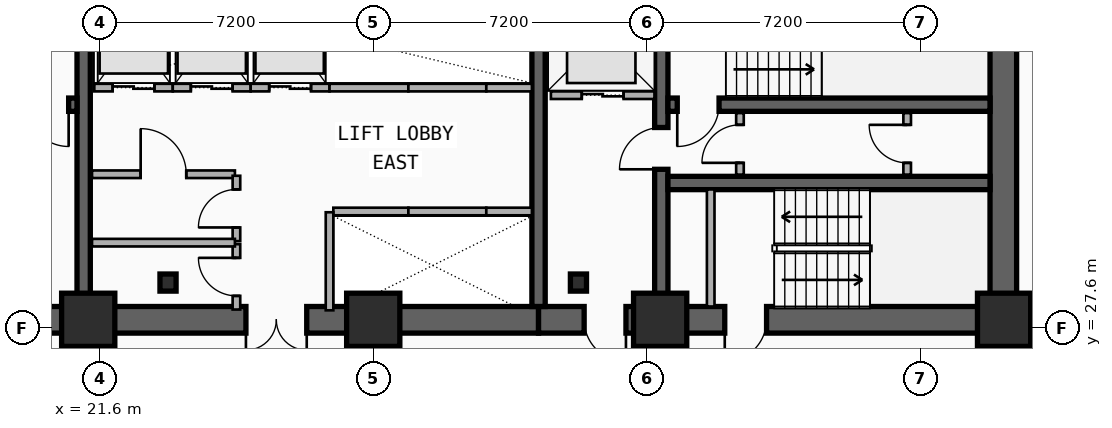
"""IFC4 building model, lengths in metres.
Left out: names, types, materials, properties, quantities, classifications, styles, units other than length and angle.
Written with IfcOpenShell. Run it as: python <this file> out.ifc"""

import sys

from ifc_helpers import new_model, si_unit, direction, frame, frame_2d, origin, origin_2d, place, context, subcontext, project, spatial, rectangle, i_section, extrude, element, fill, save


model = new_model("IFC4")
c1 = context("Model", 3, precision=1e-05, world=origin(), true_north=direction((0.0, 1.0)))
c2 = subcontext(c1, "Body", "Model", "MODEL_VIEW")
j1 = project(units=[si_unit("LENGTHUNIT", "METRE"), si_unit("PLANEANGLEUNIT", "RADIAN")], contexts=[c1])
p1 = place(None, origin())
s1 = spatial("IfcSite", under=j1, at=p1, CompositionType="ELEMENT")
p2 = place(p1, origin())
s2 = spatial("IfcBuilding", under=s1, at=p2, CompositionType="ELEMENT")
p3 = place(p2, frame((0.0, 0.0, 57.0)))
s3 = spatial("IfcBuildingStorey", under=s2, at=p3, CompositionType="ELEMENT", Elevation=57.0)
p4 = place(p3, frame((21.18, 27.82, 0.0), z_axis=(0.0, 0.0, 1.0), x_axis=(-1.0, 0.0, 0.0)))
e1 = element("IfcWall", 1, at=p4, inside=s3, PredefinedType="SHEAR", context=c2, shape_type="SweptSolid", body=[
    extrude(rectangle(XDim=9.03, YDim=0.7, at=frame_2d((4.515, 0.0))), origin(), (0.0, 0.0, 1.0), 3.5),
])
p5 = place(p4, frame((2.68, 0.0, 0.0)))
e2 = element("IfcOpeningElement", 2, at=p5, cuts=e1, PredefinedType="OPENING", context=c2, shape_type="SweptSolid", body=[
    extrude(rectangle(XDim=1.1, YDim=2.15, at=frame_2d((0.55, 1.075))), frame((0.0, 0.36, 0.0), z_axis=(0.0, -1.0, 0.0), x_axis=(1.0, 0.0, 0.0)), (0.0, 0.0, 1.0), 0.72),
])
p6 = place(p3, frame((33.15, 27.82, 0.0), z_axis=(0.0, 0.0, 1.0), x_axis=(-1.0, 0.0, 0.0)))
e3 = element("IfcWall", 3, at=p6, inside=s3, PredefinedType="SHEAR", context=c2, shape_type="SweptSolid", body=[
    extrude(rectangle(XDim=11.97, YDim=0.7, at=frame_2d((5.985, 0.0))), origin(), (0.0, 0.0, 1.0), 3.5),
])
p7 = place(p6, frame((6.1, 0.0, 0.0)))
e4 = element("IfcOpeningElement", 4, at=p7, cuts=e3, PredefinedType="OPENING", context=c2, shape_type="SweptSolid", body=[
    extrude(rectangle(XDim=1.6, YDim=2.2, at=frame_2d((0.8, 1.1))), frame((0.0, 0.36, 0.0), z_axis=(0.0, -1.0, 0.0), x_axis=(1.0, 0.0, 0.0)), (0.0, 0.0, 1.0), 0.72),
])
p8 = place(p3, frame((45.38, 27.82, 0.0), z_axis=(0.0, 0.0, 1.0), x_axis=(-1.0, 0.0, 0.0)))
e5 = element("IfcWall", 5, at=p8, inside=s3, PredefinedType="SHEAR", context=c2, shape_type="SweptSolid", body=[
    extrude(rectangle(XDim=12.23, YDim=0.7, at=frame_2d((6.115, 0.0))), origin(), (0.0, 0.0, 1.0), 3.5),
])
p9 = place(p8, frame((9.93, 0.0, 0.0)))
e6 = element("IfcOpeningElement", 6, at=p9, cuts=e5, PredefinedType="OPENING", context=c2, shape_type="SweptSolid", body=[
    extrude(rectangle(XDim=1.1, YDim=2.15, at=frame_2d((0.55, 1.075))), frame((0.0, 0.36, 0.0), z_axis=(0.0, -1.0, 0.0), x_axis=(1.0, 0.0, 0.0)), (0.0, 0.0, 1.0), 0.72),
])
p10 = place(p8, frame((6.23, 0.0, 0.0)))
e7 = element("IfcOpeningElement", 7, at=p10, cuts=e5, PredefinedType="OPENING", context=c2, shape_type="SweptSolid", body=[
    extrude(rectangle(XDim=1.1, YDim=2.15, at=frame_2d((0.55, 1.075))), frame((0.0, 0.36, 0.0), z_axis=(0.0, -1.0, 0.0), x_axis=(1.0, 0.0, 0.0)), (0.0, 0.0, 1.0), 0.72),
])
p11 = place(p3, frame((45.38, 28.17, 0.0), z_axis=(0.0, 0.0, 1.0), x_axis=(0.0, 1.0, 0.0)))
e8 = element("IfcWall", 8, at=p11, inside=s3, PredefinedType="SHEAR", context=c2, shape_type="SweptSolid", body=[
    extrude(rectangle(XDim=8.53, YDim=0.7, at=frame_2d((4.265, 0.0))), origin(), (0.0, 0.0, 1.0), 3.5),
])
for number, where, z_axis, x_axis in (
    (9, (21.18, 28.17, 0.0), (0.0, 0.0, 1.0), (0.0, 1.0, 0.0)),
    (10, (33.15, 28.17, 0.0), (0.0, 0.0, 1.0), (0.0, 1.0, 0.0)),
):
    element("IfcWall", number, at=place(p3, frame(where, z_axis=z_axis, x_axis=x_axis)), inside=s3, PredefinedType="SHEAR", context=c2, shape_type="SweptSolid", body=[
        extrude(rectangle(XDim=8.53, YDim=0.35, at=frame_2d((4.265, 0.0))), origin(), (0.0, 0.0, 1.0), 3.5),
    ])
p12 = place(p3, frame((36.38, 28.17, 0.0), z_axis=(0.0, 0.0, 1.0), x_axis=(0.0, 1.0, 0.0)))
e11 = element("IfcWall", 11, at=p12, inside=s3, PredefinedType="SHEAR", context=c2, shape_type="SweptSolid", body=[
    extrude(rectangle(XDim=8.53, YDim=0.35, at=frame_2d((4.265, 0.0))), origin(), (0.0, 0.0, 1.0), 3.5),
])
p13 = place(p12, frame((3.61, 0.0, 0.0)))
e12 = element("IfcOpeningElement", 12, at=p13, cuts=e11, PredefinedType="OPENING", context=c2, shape_type="SweptSolid", body=[
    extrude(rectangle(XDim=1.1, YDim=2.15, at=frame_2d((0.55, 1.075))), frame((0.0, 0.185, 0.0), z_axis=(0.0, -1.0, 0.0), x_axis=(1.0, 0.0, 0.0)), (0.0, 0.0, 1.0), 0.37),
])
p14 = place(p3, frame((21.005, 33.48, 0.0), z_axis=(0.0, 0.0, 1.0), x_axis=(-1.0, 0.0, 0.0)))
e13 = element("IfcWall", 13, at=p14, inside=s3, PredefinedType="SHEAR", context=c2, shape_type="SweptSolid", body=[
    extrude(rectangle(XDim=8.505, YDim=0.35, at=frame_2d((4.252, 0.0))), origin(), (0.0, 0.0, 1.0), 3.5),
])
p15 = place(p14, frame((0.22, 0.0, 0.0)))
e14 = element("IfcOpeningElement", 14, at=p15, cuts=e13, PredefinedType="OPENING", context=c2, shape_type="SweptSolid", body=[
    extrude(rectangle(XDim=1.1, YDim=2.15, at=frame_2d((0.55, 1.075))), frame((0.0, 0.185, 0.0), z_axis=(0.0, -1.0, 0.0), x_axis=(1.0, 0.0, 0.0)), (0.0, 0.0, 1.0), 0.37),
])
p16 = place(p3, frame((45.03, 33.48, 0.0), z_axis=(0.0, 0.0, 1.0), x_axis=(-1.0, 0.0, 0.0)))
e15 = element("IfcWall", 15, at=p16, inside=s3, PredefinedType="SHEAR", context=c2, shape_type="SweptSolid", body=[
    extrude(rectangle(XDim=8.475, YDim=0.35, at=frame_2d((4.238, 0.0))), origin(), (0.0, 0.0, 1.0), 3.5),
])
p17 = place(p16, frame((7.13, 0.0, 0.0)))
e16 = element("IfcOpeningElement", 16, at=p17, cuts=e15, PredefinedType="OPENING", context=c2, shape_type="SweptSolid", body=[
    extrude(rectangle(XDim=1.1, YDim=2.15, at=frame_2d((0.55, 1.075))), frame((0.0, 0.185, 0.0), z_axis=(0.0, -1.0, 0.0), x_axis=(1.0, 0.0, 0.0)), (0.0, 0.0, 1.0), 0.37),
])
p18 = place(p3, frame((36.555, 31.42, 0.0), z_axis=(0.0, 0.0, 1.0), x_axis=(1.0, 0.0, 0.0)))
e17 = element("IfcWall", 17, at=p18, inside=s3, PredefinedType="SHEAR", context=c2, shape_type="SweptSolid", body=[
    extrude(rectangle(XDim=8.475, YDim=0.35, at=frame_2d((4.238, 0.0))), origin(), (0.0, 0.0, 1.0), 3.5),
])
for number, where, z_axis, x_axis in (
    (18, (23.4, 28.8, 0.0), (0.0, 0.0, 1.0), (1.0, 0.0, 0.0)),
    (19, (34.2, 28.8, 0.0), (0.0, 0.0, 1.0), (1.0, 0.0, 0.0)),
):
    element("IfcColumn", number, at=place(p3, frame(where, z_axis=z_axis, x_axis=x_axis)), inside=s3, PredefinedType="COLUMN", context=c2, shape_type="SweptSolid", body=[
        extrude(i_section(OverallWidth=0.424, OverallDepth=0.45, WebThickness=0.041, FlangeThickness=0.065, FilletRadius=0.015, at=origin_2d()), origin(), (0.0, 0.0, 1.0), 3.5),
    ])
for number, where, z_axis, x_axis in (
    (20, (21.3, 27.82, 0.0), (0.0, 0.0, 1.0), (1.0, 0.0, 0.0)),
    (21, (28.8, 27.82, 0.0), (0.0, 0.0, 1.0), (1.0, 0.0, 0.0)),
    (22, (36.35, 27.82, 0.0), (0.0, 0.0, 1.0), (1.0, 0.0, 0.0)),
    (23, (45.4, 27.82, 0.0), (0.0, 0.0, 1.0), (1.0, 0.0, 0.0)),
):
    element("IfcColumn", number, at=place(p3, frame(where, z_axis=z_axis, x_axis=x_axis)), inside=s3, PredefinedType="COLUMN", context=c2, shape_type="SweptSolid", body=[
        extrude(rectangle(XDim=1.4, YDim=1.4, at=origin_2d()), origin(), (0.0, 0.0, 1.0), 3.5),
    ])
p19 = place(p3, frame((33.475, 33.73, 0.0), z_axis=(0.0, 0.0, 1.0), x_axis=(1.0, 0.0, 0.0)))
e24 = element("IfcWall", 24, at=p19, inside=s3, PredefinedType="PARTITIONING", context=c2, shape_type="SweptSolid", body=[
    extrude(rectangle(XDim=2.725, YDim=0.2, at=frame_2d((1.362, 0.0))), origin(), (0.0, 0.0, 1.0), 2.212),
])
p20 = place(p19, frame((0.812, 0.0, 0.0)))
e25 = element("IfcOpeningElement", 25, at=p20, cuts=e24, PredefinedType="OPENING", context=c2, shape_type="SweptSolid", body=[
    extrude(rectangle(XDim=1.1, YDim=2.15, at=frame_2d((0.55, 1.075))), frame((0.0, 0.11, 0.0), z_axis=(0.0, -1.0, 0.0), x_axis=(1.0, 0.0, 0.0)), (0.0, 0.0, 1.0), 0.22),
])
p21 = place(p3, frame((27.75, 30.67, 0.0), z_axis=(0.0, 0.0, 1.0), x_axis=(1.0, 0.0, 0.0)))
e26 = element("IfcWall", 26, at=p21, inside=s3, PredefinedType="PARTITIONING", context=c2, shape_type="SweptSolid", body=[
    extrude(rectangle(XDim=1.975, YDim=0.2, at=frame_2d((0.988, 0.0))), origin(), (0.0, 0.0, 1.0), 2.212),
])
p22 = place(p3, frame((27.65, 28.07, 0.0), z_axis=(0.0, 0.0, 1.0), x_axis=(0.0, 1.0, 0.0)))
e27 = element("IfcWall", 27, at=p22, inside=s3, PredefinedType="PARTITIONING", context=c2, shape_type="SweptSolid", body=[
    extrude(rectangle(XDim=2.58, YDim=0.2, at=frame_2d((1.29, 0.0))), origin(), (0.0, 0.0, 1.0), 2.212),
])
p23 = place(p3, frame((29.725, 30.67, 0.0), z_axis=(0.0, 0.0, 1.0), x_axis=(1.0, 0.0, 0.0)))
e28 = element("IfcWall", 28, at=p23, inside=s3, PredefinedType="PARTITIONING", context=c2, shape_type="SweptSolid", body=[
    extrude(rectangle(XDim=2.05, YDim=0.2, at=frame_2d((1.025, 0.0))), origin(), (0.0, 0.0, 1.0), 2.62),
])
p24 = place(p3, frame((31.775, 30.67, 0.0), z_axis=(0.0, 0.0, 1.0), x_axis=(1.0, 0.0, 0.0)))
e29 = element("IfcWall", 29, at=p24, inside=s3, PredefinedType="PARTITIONING", context=c2, shape_type="SweptSolid", body=[
    extrude(rectangle(XDim=1.2, YDim=0.2, at=frame_2d((0.6, 0.0))), origin(), (0.0, 0.0, 1.0), 2.62),
])
p25 = place(p3, frame((21.46, 33.93, 0.0), z_axis=(0.0, 0.0, 1.0), x_axis=(1.0, 0.0, 0.0)))
e30 = element("IfcWall", 30, at=p25, inside=s3, PredefinedType="PARTITIONING", context=c2, shape_type="SweptSolid", body=[
    extrude(rectangle(XDim=2.065, YDim=0.2, at=frame_2d((1.032, 0.0))), origin(), (0.0, 0.0, 1.0), 2.212),
])
p26 = place(p25, frame((0.482, 0.0, 0.0)))
e31 = element("IfcOpeningElement", 31, at=p26, cuts=e30, PredefinedType="OPENING", context=c2, shape_type="SweptSolid", body=[
    extrude(rectangle(XDim=1.1, YDim=2.15, at=frame_2d((0.55, 1.075))), frame((0.0, 0.11, 0.0), z_axis=(0.0, -1.0, 0.0), x_axis=(1.0, 0.0, 0.0)), (0.0, 0.0, 1.0), 0.22),
])
p27 = place(p3, frame((23.525, 33.93, 0.0), z_axis=(0.0, 0.0, 1.0), x_axis=(1.0, 0.0, 0.0)))
e32 = element("IfcWall", 32, at=p27, inside=s3, PredefinedType="PARTITIONING", context=c2, shape_type="SweptSolid", body=[
    extrude(rectangle(XDim=2.05, YDim=0.2, at=frame_2d((1.025, 0.0))), origin(), (0.0, 0.0, 1.0), 3.24),
])
p28 = place(p27, frame((0.475, 0.0, 0.0)))
e33 = element("IfcOpeningElement", 33, at=p28, cuts=e32, PredefinedType="OPENING", context=c2, shape_type="SweptSolid", body=[
    extrude(rectangle(XDim=1.1, YDim=2.15, at=frame_2d((0.55, 1.075))), frame((0.0, 0.11, 0.0), z_axis=(0.0, -1.0, 0.0), x_axis=(1.0, 0.0, 0.0)), (0.0, 0.0, 1.0), 0.22),
])
p29 = place(p3, frame((25.575, 33.93, 0.0), z_axis=(0.0, 0.0, 1.0), x_axis=(1.0, 0.0, 0.0)))
e34 = element("IfcWall", 34, at=p29, inside=s3, PredefinedType="PARTITIONING", context=c2, shape_type="SweptSolid", body=[
    extrude(rectangle(XDim=2.075, YDim=0.2, at=frame_2d((1.038, 0.0))), origin(), (0.0, 0.0, 1.0), 3.24),
])
p30 = place(p29, frame((0.488, 0.0, 0.0)))
e35 = element("IfcOpeningElement", 35, at=p30, cuts=e34, PredefinedType="OPENING", context=c2, shape_type="SweptSolid", body=[
    extrude(rectangle(XDim=1.1, YDim=2.15, at=frame_2d((0.55, 1.075))), frame((0.0, 0.11, 0.0), z_axis=(0.0, -1.0, 0.0), x_axis=(1.0, 0.0, 0.0)), (0.0, 0.0, 1.0), 0.22),
])
p31 = place(p3, frame((27.65, 33.93, 0.0), z_axis=(0.0, 0.0, 1.0), x_axis=(1.0, 0.0, 0.0)))
e36 = element("IfcWall", 36, at=p31, inside=s3, PredefinedType="PARTITIONING", context=c2, shape_type="SweptSolid", body=[
    extrude(rectangle(XDim=2.075, YDim=0.2, at=frame_2d((1.038, 0.0))), origin(), (0.0, 0.0, 1.0), 2.212),
])
p32 = place(p3, frame((29.725, 33.93, 0.0), z_axis=(0.0, 0.0, 1.0), x_axis=(1.0, 0.0, 0.0)))
e37 = element("IfcWall", 37, at=p32, inside=s3, PredefinedType="PARTITIONING", context=c2, shape_type="SweptSolid", body=[
    extrude(rectangle(XDim=2.05, YDim=0.2, at=frame_2d((1.025, 0.0))), origin(), (0.0, 0.0, 1.0), 3.24),
])
p33 = place(p3, frame((31.775, 33.93, 0.0), z_axis=(0.0, 0.0, 1.0), x_axis=(1.0, 0.0, 0.0)))
e38 = element("IfcWall", 38, at=p33, inside=s3, PredefinedType="PARTITIONING", context=c2, shape_type="SweptSolid", body=[
    extrude(rectangle(XDim=1.2, YDim=0.2, at=frame_2d((0.6, 0.0))), origin(), (0.0, 0.0, 1.0), 3.24),
])
p34 = place(p3, frame((37.68, 28.17, 0.0), z_axis=(0.0, 0.0, 1.0), x_axis=(0.0, 1.0, 0.0)))
e39 = element("IfcWall", 39, at=p34, inside=s3, PredefinedType="PARTITIONING", context=c2, shape_type="SweptSolid", body=[
    extrude(rectangle(XDim=3.08, YDim=0.2, at=frame_2d((1.54, 0.0))), origin(), (0.0, 0.0, 1.0), 2.62),
])
p35 = place(p3, frame((38.45, 31.64, 0.0), z_axis=(0.0, 0.0, 1.0), x_axis=(0.0, 1.0, 0.0)))
e40 = element("IfcWall", 40, at=p35, inside=s3, PredefinedType="PARTITIONING", context=c2, shape_type="SweptSolid", body=[
    extrude(rectangle(XDim=1.62, YDim=0.2, at=frame_2d((0.81, 0.0))), origin(), (0.0, 0.0, 1.0), 3.24),
])
p36 = place(p35, frame((0.31, 0.0, 0.0)))
e41 = element("IfcOpeningElement", 41, at=p36, cuts=e40, PredefinedType="OPENING", context=c2, shape_type="SweptSolid", body=[
    extrude(rectangle(XDim=1.0, YDim=2.15, at=frame_2d((0.5, 1.075))), frame((0.0, 0.11, 0.0), z_axis=(0.0, -1.0, 0.0), x_axis=(1.0, 0.0, 0.0)), (0.0, 0.0, 1.0), 0.22),
])
p37 = place(p3, frame((42.85, 31.64, 0.0), z_axis=(0.0, 0.0, 1.0), x_axis=(0.0, 1.0, 0.0)))
e42 = element("IfcWall", 42, at=p37, inside=s3, PredefinedType="PARTITIONING", context=c2, shape_type="SweptSolid", body=[
    extrude(rectangle(XDim=1.62, YDim=0.2, at=frame_2d((0.81, 0.0))), origin(), (0.0, 0.0, 1.0), 3.24),
])
p38 = place(p37, frame((0.31, 0.0, 0.0)))
e43 = element("IfcOpeningElement", 43, at=p38, cuts=e42, PredefinedType="OPENING", context=c2, shape_type="SweptSolid", body=[
    extrude(rectangle(XDim=1.0, YDim=2.15, at=frame_2d((0.5, 1.075))), frame((0.0, 0.11, 0.0), z_axis=(0.0, -1.0, 0.0), x_axis=(1.0, 0.0, 0.0)), (0.0, 0.0, 1.0), 0.22),
])
p39 = place(p3, frame((21.4, 31.65, 0.0), z_axis=(0.0, 0.0, 1.0), x_axis=(1.0, 0.0, 0.0)))
e44 = element("IfcWall", 44, at=p39, inside=s3, PredefinedType="PARTITIONING", context=c2, shape_type="SweptSolid", body=[
    extrude(rectangle(XDim=3.76, YDim=0.2, at=frame_2d((1.88, 0.0))), origin(), (0.0, 0.0, 1.0), 2.28),
])
p40 = place(p39, frame((1.28, 0.0, 0.0)))
e45 = element("IfcOpeningElement", 45, at=p40, cuts=e44, PredefinedType="OPENING", context=c2, shape_type="SweptSolid", body=[
    extrude(rectangle(XDim=1.2, YDim=2.15, at=frame_2d((0.6, 1.075))), frame((0.0, 0.11, 0.0), z_axis=(0.0, -1.0, 0.0), x_axis=(1.0, 0.0, 0.0)), (0.0, 0.0, 1.0), 0.22),
])
p41 = place(p3, frame((25.2, 28.09, 0.0), z_axis=(0.0, 0.0, 1.0), x_axis=(0.0, 1.0, 0.0)))
e46 = element("IfcWall", 46, at=p41, inside=s3, PredefinedType="PARTITIONING", context=c2, shape_type="SweptSolid", body=[
    extrude(rectangle(XDim=1.72, YDim=0.2, at=frame_2d((0.86, 0.0))), origin(), (0.0, 0.0, 1.0), 2.62),
])
p42 = place(p41, frame((0.36, 0.0, 0.0)))
e47 = element("IfcOpeningElement", 47, at=p42, cuts=e46, PredefinedType="OPENING", context=c2, shape_type="SweptSolid", body=[
    extrude(rectangle(XDim=1.0, YDim=2.15, at=frame_2d((0.5, 1.075))), frame((0.0, 0.11, 0.0), z_axis=(0.0, -1.0, 0.0), x_axis=(1.0, 0.0, 0.0)), (0.0, 0.0, 1.0), 0.22),
])
p43 = place(p3, frame((25.2, 29.89, 0.0), z_axis=(0.0, 0.0, 1.0), x_axis=(0.0, 1.0, 0.0)))
e48 = element("IfcWall", 48, at=p43, inside=s3, PredefinedType="PARTITIONING", context=c2, shape_type="SweptSolid", body=[
    extrude(rectangle(XDim=1.72, YDim=0.2, at=frame_2d((0.86, 0.0))), origin(), (0.0, 0.0, 1.0), 3.24),
])
p44 = place(p43, frame((0.36, 0.0, 0.0)))
e49 = element("IfcOpeningElement", 49, at=p44, cuts=e48, PredefinedType="OPENING", context=c2, shape_type="SweptSolid", body=[
    extrude(rectangle(XDim=1.0, YDim=2.15, at=frame_2d((0.5, 1.075))), frame((0.0, 0.11, 0.0), z_axis=(0.0, -1.0, 0.0), x_axis=(1.0, 0.0, 0.0)), (0.0, 0.0, 1.0), 0.22),
])
p45 = place(p3, frame((21.4, 29.85, 0.0), z_axis=(0.0, 0.0, 1.0), x_axis=(1.0, 0.0, 0.0)))
e50 = element("IfcWall", 50, at=p45, inside=s3, PredefinedType="PARTITIONING", context=c2, shape_type="SweptSolid", body=[
    extrude(rectangle(XDim=3.76, YDim=0.2, at=frame_2d((1.88, 0.0))), origin(), (0.0, 0.0, 1.0), 2.28),
])
p46 = place(p3, frame((45.41, 27.6, 0.0), z_axis=(0.0, 0.0, 1.0), x_axis=(1.0, 0.0, 0.0)))
e51 = element("IfcWall", 51, at=p46, inside=s3, PredefinedType="PARTITIONING", context=c2, shape_type="SweptSolid", body=[
    extrude(rectangle(XDim=0.91, YDim=0.16, at=frame_2d((0.455, 0.0))), origin(), (0.0, 0.0, 1.0), 2.28),
])
p47 = place(p20, origin())
e52 = element("IfcDoor", 52, at=p47, inside=s3, OperationType="DOUBLE_DOOR_SLIDING", PredefinedType="DOOR", context=c2, shape_type="SweptSolid", body=[
    extrude(rectangle(XDim=1.1, YDim=2.15, at=frame_2d((0.55, 1.075))), frame((0.0, 0.025, 0.0), z_axis=(0.0, -1.0, 0.0), x_axis=(1.0, 0.0, 0.0)), (0.0, 0.0, 1.0), 0.05),
])
fill(e25, e52)
p48 = place(p26, origin())
e53 = element("IfcDoor", 53, at=p48, inside=s3, OperationType="DOUBLE_DOOR_SLIDING", PredefinedType="DOOR", context=c2, shape_type="SweptSolid", body=[
    extrude(rectangle(XDim=1.1, YDim=2.15, at=frame_2d((0.55, 1.075))), frame((0.0, 0.025, 0.0), z_axis=(0.0, -1.0, 0.0), x_axis=(1.0, 0.0, 0.0)), (0.0, 0.0, 1.0), 0.05),
])
fill(e31, e53)
p49 = place(p28, origin())
e54 = element("IfcDoor", 54, at=p49, inside=s3, OperationType="DOUBLE_DOOR_SLIDING", PredefinedType="DOOR", context=c2, shape_type="SweptSolid", body=[
    extrude(rectangle(XDim=1.1, YDim=2.15, at=frame_2d((0.55, 1.075))), frame((0.0, 0.025, 0.0), z_axis=(0.0, -1.0, 0.0), x_axis=(1.0, 0.0, 0.0)), (0.0, 0.0, 1.0), 0.05),
])
fill(e33, e54)
p50 = place(p30, origin())
e55 = element("IfcDoor", 55, at=p50, inside=s3, OperationType="DOUBLE_DOOR_SLIDING", PredefinedType="DOOR", context=c2, shape_type="SweptSolid", body=[
    extrude(rectangle(XDim=1.1, YDim=2.15, at=frame_2d((0.55, 1.075))), frame((0.0, 0.025, 0.0), z_axis=(0.0, -1.0, 0.0), x_axis=(1.0, 0.0, 0.0)), (0.0, 0.0, 1.0), 0.05),
])
fill(e35, e55)
p51 = place(p15, origin())
e56 = element("IfcDoor", 56, at=p51, inside=s3, OperationType="SINGLE_SWING_LEFT", PredefinedType="DOOR", context=c2, shape_type="SweptSolid", body=[
    extrude(rectangle(XDim=1.1, YDim=2.15, at=frame_2d((0.55, 1.075))), frame((0.0, 0.025, 0.0), z_axis=(0.0, -1.0, 0.0), x_axis=(1.0, 0.0, 0.0)), (0.0, 0.0, 1.0), 0.05),
])
fill(e14, e56)
p52 = place(p17, origin())
e57 = element("IfcDoor", 57, at=p52, inside=s3, OperationType="SINGLE_SWING_RIGHT", PredefinedType="DOOR", context=c2, shape_type="SweptSolid", body=[
    extrude(rectangle(XDim=1.1, YDim=2.15, at=frame_2d((0.55, 1.075))), frame((0.0, 0.025, 0.0), z_axis=(0.0, -1.0, 0.0), x_axis=(1.0, 0.0, 0.0)), (0.0, 0.0, 1.0), 0.05),
])
fill(e16, e57)
p53 = place(p13, origin())
e58 = element("IfcDoor", 58, at=p53, inside=s3, OperationType="SINGLE_SWING_LEFT", PredefinedType="DOOR", context=c2, shape_type="SweptSolid", body=[
    extrude(rectangle(XDim=1.1, YDim=2.15, at=frame_2d((0.55, 1.075))), frame((0.0, 0.025, 0.0), z_axis=(0.0, -1.0, 0.0), x_axis=(1.0, 0.0, 0.0)), (0.0, 0.0, 1.0), 0.05),
])
fill(e12, e58)
p54 = place(p9, origin())
e59 = element("IfcDoor", 59, at=p54, inside=s3, OperationType="SINGLE_SWING_LEFT", PredefinedType="DOOR", context=c2, shape_type="SweptSolid", body=[
    extrude(rectangle(XDim=1.1, YDim=2.15, at=frame_2d((0.55, 1.075))), frame((0.0, 0.025, 0.0), z_axis=(0.0, -1.0, 0.0), x_axis=(1.0, 0.0, 0.0)), (0.0, 0.0, 1.0), 0.05),
])
fill(e6, e59)
p55 = place(p10, origin())
e60 = element("IfcDoor", 60, at=p55, inside=s3, OperationType="SINGLE_SWING_RIGHT", PredefinedType="DOOR", context=c2, shape_type="SweptSolid", body=[
    extrude(rectangle(XDim=1.1, YDim=2.15, at=frame_2d((0.55, 1.075))), frame((0.0, 0.025, 0.0), z_axis=(0.0, -1.0, 0.0), x_axis=(1.0, 0.0, 0.0)), (0.0, 0.0, 1.0), 0.05),
])
fill(e7, e60)
p56 = place(p7, origin())
e61 = element("IfcDoor", 61, at=p56, inside=s3, OperationType="SINGLE_SWING_LEFT", PredefinedType="DOOR", context=c2, shape_type="SweptSolid", body=[
    extrude(rectangle(XDim=1.6, YDim=2.2, at=frame_2d((0.8, 1.1))), frame((0.0, 0.025, 0.0), z_axis=(0.0, -1.0, 0.0), x_axis=(1.0, 0.0, 0.0)), (0.0, 0.0, 1.0), 0.05),
])
fill(e4, e61)
p57 = place(p36, origin())
e62 = element("IfcDoor", 62, at=p57, inside=s3, OperationType="SINGLE_SWING_LEFT", PredefinedType="DOOR", context=c2, shape_type="SweptSolid", body=[
    extrude(rectangle(XDim=1.0, YDim=2.15, at=frame_2d((0.5, 1.075))), frame((0.0, 0.025, 0.0), z_axis=(0.0, -1.0, 0.0), x_axis=(1.0, 0.0, 0.0)), (0.0, 0.0, 1.0), 0.05),
])
fill(e41, e62)
p58 = place(p38, origin())
e63 = element("IfcDoor", 63, at=p58, inside=s3, OperationType="SINGLE_SWING_RIGHT", PredefinedType="DOOR", context=c2, shape_type="SweptSolid", body=[
    extrude(rectangle(XDim=1.0, YDim=2.15, at=frame_2d((0.5, 1.075))), frame((0.0, 0.025, 0.0), z_axis=(0.0, -1.0, 0.0), x_axis=(1.0, 0.0, 0.0)), (0.0, 0.0, 1.0), 0.05),
])
fill(e43, e63)
p59 = place(p40, origin())
e64 = element("IfcDoor", 64, at=p59, inside=s3, OperationType="SINGLE_SWING_LEFT", PredefinedType="DOOR", context=c2, shape_type="SweptSolid", body=[
    extrude(rectangle(XDim=1.2, YDim=2.15, at=frame_2d((0.6, 1.075))), frame((0.0, 0.025, 0.0), z_axis=(0.0, -1.0, 0.0), x_axis=(1.0, 0.0, 0.0)), (0.0, 0.0, 1.0), 0.05),
])
fill(e45, e64)
p60 = place(p42, origin())
e65 = element("IfcDoor", 65, at=p60, inside=s3, OperationType="SINGLE_SWING_RIGHT", PredefinedType="DOOR", context=c2, shape_type="SweptSolid", body=[
    extrude(rectangle(XDim=1.0, YDim=2.15, at=frame_2d((0.5, 1.075))), frame((0.0, 0.025, 0.0), z_axis=(0.0, -1.0, 0.0), x_axis=(1.0, 0.0, 0.0)), (0.0, 0.0, 1.0), 0.05),
])
fill(e47, e65)
p61 = place(p44, origin())
e66 = element("IfcDoor", 66, at=p61, inside=s3, OperationType="SINGLE_SWING_LEFT", PredefinedType="DOOR", context=c2, shape_type="SweptSolid", body=[
    extrude(rectangle(XDim=1.0, YDim=2.15, at=frame_2d((0.5, 1.075))), frame((0.0, 0.025, 0.0), z_axis=(0.0, -1.0, 0.0), x_axis=(1.0, 0.0, 0.0)), (0.0, 0.0, 1.0), 0.05),
])
fill(e49, e66)
save(model, sys.argv[1])
